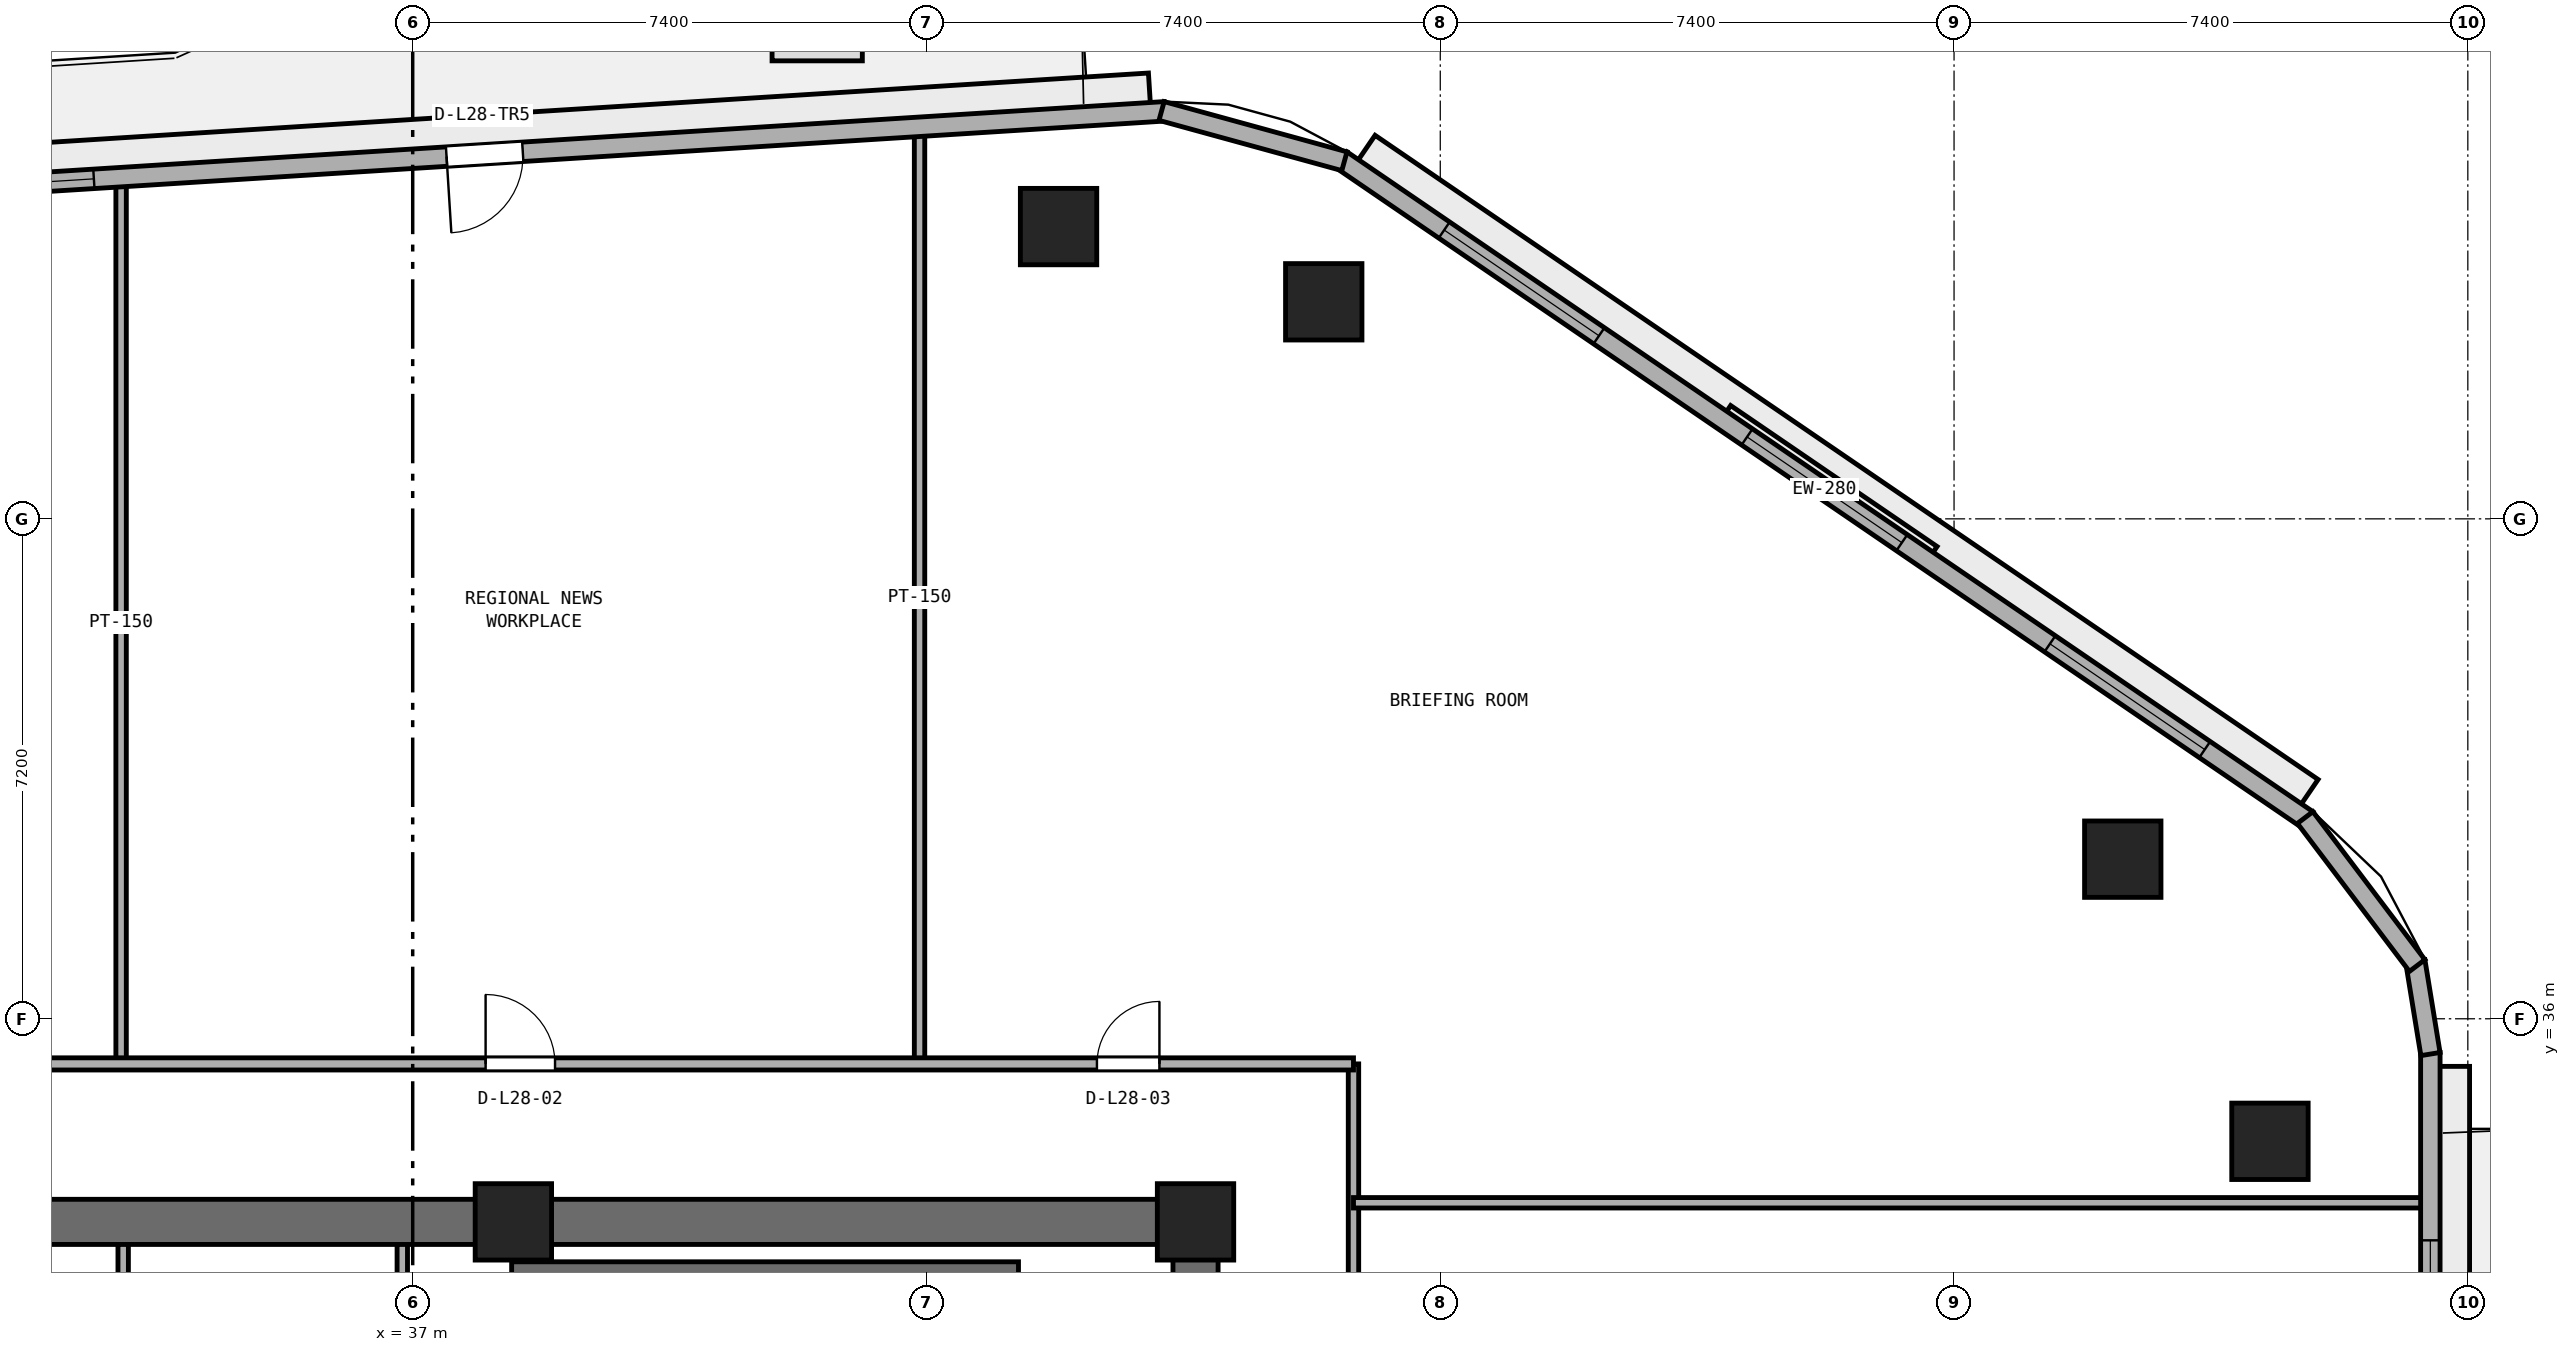
"""IFC4 building model, lengths in metres.
Left out: names, types, materials, properties, quantities, classifications, styles, units other than length and angle.
Written with IfcOpenShell. Run it as: python <this file> out.ifc"""

import sys

from ifc_helpers import new_model, si_unit, direction, frame, frame_2d, origin, origin_2d, place, context, subcontext, project, spatial, rectangle, extrude, element, fill, save


model = new_model("IFC4")
c1 = context("Model", 3, precision=1e-05, world=origin(), true_north=direction((0.0, 1.0)))
c2 = subcontext(c1, "Body", "Model", "MODEL_VIEW")
j1 = project(units=[si_unit("LENGTHUNIT", "METRE"), si_unit("PLANEANGLEUNIT", "RADIAN")], contexts=[c1])
p1 = place(None, origin())
s1 = spatial("IfcSite", under=j1, at=p1, CompositionType="ELEMENT")
p2 = place(p1, origin())
s2 = spatial("IfcBuilding", under=s1, at=p2, CompositionType="ELEMENT")
p3 = place(p2, frame((0.0, 0.0, 112.4)))
s3 = spatial("IfcBuildingStorey", under=s2, at=p3, CompositionType="ELEMENT", Elevation=112.4)
p4 = place(p3, frame((25.4, 33.075, 0.0), z_axis=(0.0, 0.0, 1.0), x_axis=(1.0, 0.0, 0.0)))
e1 = element("IfcWall", 1, at=p4, inside=s3, PredefinedType="SHEAR", context=c2, shape_type="SweptSolid", body=[
    extrude(rectangle(XDim=23.2, YDim=0.65, at=frame_2d((11.6, 0.0))), origin(), (0.0, 0.0, 1.0), 3.525),
])
p5 = place(p3, frame((48.275, 17.65, 0.0), z_axis=(0.0, 0.0, 1.0), x_axis=(0.0, 1.0, 0.0)))
e2 = element("IfcWall", 2, at=p5, inside=s3, PredefinedType="SHEAR", context=c2, shape_type="SweptSolid", body=[
    extrude(rectangle(XDim=15.1, YDim=0.65, at=frame_2d((7.55, 0.0))), origin(), (0.0, 0.0, 1.0), 3.525),
])
p6 = place(p5, frame((5.65, 0.0, 0.0)))
e3 = element("IfcOpeningElement", 3, at=p6, cuts=e2, PredefinedType="OPENING", context=c2, shape_type="SweptSolid", body=[
    extrude(rectangle(XDim=1.5, YDim=2.15, at=frame_2d((0.75, 1.075))), frame((0.0, 0.335, 0.0), z_axis=(0.0, -1.0, 0.0), x_axis=(1.0, 0.0, 0.0)), (0.0, 0.0, 1.0), 0.67),
])
for number, where, z_axis, x_axis in (
    (4, (48.275, 33.075, 0.0), (0.0, 0.0, 1.0), (1.0, 0.0, 0.0)),
    (5, (38.45, 33.075, 0.0), (0.0, 0.0, 1.0), (1.0, 0.0, 0.0)),
):
    element("IfcColumn", number, at=place(p3, frame(where, z_axis=z_axis, x_axis=x_axis)), inside=s3, PredefinedType="PILASTER", context=c2, shape_type="SweptSolid", body=[
        extrude(rectangle(XDim=1.1, YDim=1.1, at=origin_2d()), origin(), (0.0, 0.0, 1.0), 3.8),
    ])
for number, where, z_axis, x_axis in (
    (6, (63.75, 34.235, 0.0), (0.0, 0.0, 1.0), (1.0, 0.0, 0.0)),
    (7, (61.63, 38.299, 0.0), (0.0, 0.0, 1.0), (1.0, 0.0, 0.0)),
    (8, (50.122, 46.326, 0.0), (0.0, 0.0, 1.0), (1.0, 0.0, 0.0)),
    (9, (46.302, 47.409, 0.0), (0.0, 0.0, 1.0), (1.0, 0.0, 0.0)),
):
    element("IfcColumn", number, at=place(p3, frame(where, z_axis=z_axis, x_axis=x_axis)), inside=s3, PredefinedType="COLUMN", context=c2, shape_type="SweptSolid", body=[
        extrude(rectangle(XDim=1.1, YDim=1.1, at=origin_2d()), origin(), (0.0, 0.0, 1.0), 3.8),
    ])
p7 = place(p3, frame((38.425, 32.375, 0.0), z_axis=(0.0, 0.0, 1.0), x_axis=(1.0, 0.0, 0.0)))
e10 = element("IfcWall", 10, at=p7, inside=s3, PredefinedType="SHEAR", context=c2, shape_type="SweptSolid", body=[
    extrude(rectangle(XDim=7.3, YDim=0.25, at=frame_2d((3.65, 0.0))), origin(), (0.0, 0.0, 1.0), 3.525),
])
for number, where, z_axis, x_axis in (
    (11, (32.83, 30.65, 0.0), (0.0, 0.0, 1.0), (0.0, 1.0, 0.0)),
    (12, (36.85, 30.65, 0.0), (0.0, 0.0, 1.0), (0.0, 1.0, 0.0)),
):
    element("IfcWall", number, at=place(p3, frame(where, z_axis=z_axis, x_axis=x_axis)), inside=s3, PredefinedType="PARTITIONING", context=c2, shape_type="SweptSolid", body=[
        extrude(rectangle(XDim=2.1, YDim=0.15, at=frame_2d((1.05, 0.0))), origin(), (0.0, 0.0, 1.0), 3.525),
    ])
p8 = place(p3, frame((50.55, 15.05, 0.0), z_axis=(0.0, 0.0, 1.0), x_axis=(0.0, 1.0, 0.0)))
e13 = element("IfcWall", 13, at=p8, inside=s3, PredefinedType="PARTITIONING", context=c2, shape_type="SweptSolid", body=[
    extrude(rectangle(XDim=20.3, YDim=0.15, at=frame_2d((10.15, 0.0))), origin(), (0.0, 0.0, 1.0), 3.525),
])
p9 = place(p8, frame((9.7, 0.0, 0.0)))
e14 = element("IfcOpeningElement", 14, at=p9, cuts=e13, PredefinedType="OPENING", context=c2, shape_type="SweptSolid", body=[
    extrude(rectangle(XDim=0.9, YDim=2.1, at=frame_2d((0.45, 1.05))), frame((0.0, 0.085, 0.0), z_axis=(0.0, -1.0, 0.0), x_axis=(1.0, 0.0, 0.0)), (0.0, 0.0, 1.0), 0.17),
])
p10 = place(p3, frame((44.3, 35.35, 0.0), z_axis=(0.0, 0.0, 1.0), x_axis=(0.0, 1.0, 0.0)))
e15 = element("IfcWall", 15, at=p10, inside=s3, PredefinedType="PARTITIONING", context=c2, shape_type="SweptSolid", body=[
    extrude(rectangle(XDim=13.432, YDim=0.15, at=frame_2d((6.716, 0.0))), origin(), (0.0, 0.0, 1.0), 3.525),
])
p11 = place(p3, frame((32.8, 35.35, 0.0), z_axis=(0.0, 0.0, 1.0), x_axis=(0.0, 1.0, 0.0)))
e16 = element("IfcWall", 16, at=p11, inside=s3, PredefinedType="PARTITIONING", context=c2, shape_type="SweptSolid", body=[
    extrude(rectangle(XDim=12.707, YDim=0.15, at=frame_2d((6.353, 0.0))), origin(), (0.0, 0.0, 1.0), 3.525),
])
p12 = place(p3, frame((50.55, 33.35, 0.0), z_axis=(0.0, 0.0, 1.0), x_axis=(1.0, 0.0, 0.0)))
e17 = element("IfcWall", 17, at=p12, inside=s3, PredefinedType="PARTITIONING", context=c2, shape_type="SweptSolid", body=[
    extrude(rectangle(XDim=15.445, YDim=0.15, at=frame_2d((7.723, 0.0))), origin(), (0.0, 0.0, 1.0), 2.908),
])
p13 = place(p3, frame((23.45, 35.35, 0.0), z_axis=(0.0, 0.0, 1.0), x_axis=(1.0, 0.0, 0.0)))
e18 = element("IfcWall", 18, at=p13, inside=s3, PredefinedType="PARTITIONING", context=c2, shape_type="SweptSolid", body=[
    extrude(rectangle(XDim=27.1, YDim=0.175, at=frame_2d((13.55, 0.0))), origin(), (0.0, 0.0, 1.0), 3.525),
])
p14 = place(p13, frame((4.295, 0.0, 0.0)))
e19 = element("IfcOpeningElement", 19, at=p14, cuts=e18, PredefinedType="OPENING", context=c2, shape_type="SweptSolid", body=[
    extrude(rectangle(XDim=1.0, YDim=2.12, at=frame_2d((0.5, 1.06))), frame((0.0, 0.097, 0.0), z_axis=(0.0, -1.0, 0.0), x_axis=(1.0, 0.0, 0.0)), (0.0, 0.0, 1.0), 0.195),
])
p15 = place(p13, frame((14.6, 0.0, 0.0)))
e20 = element("IfcOpeningElement", 20, at=p15, cuts=e18, PredefinedType="OPENING", context=c2, shape_type="SweptSolid", body=[
    extrude(rectangle(XDim=1.0, YDim=2.12, at=frame_2d((0.5, 1.06))), frame((0.0, 0.097, 0.0), z_axis=(0.0, -1.0, 0.0), x_axis=(1.0, 0.0, 0.0)), (0.0, 0.0, 1.0), 0.195),
])
p16 = place(p13, frame((23.405, 0.0, 0.0)))
e21 = element("IfcOpeningElement", 21, at=p16, cuts=e18, PredefinedType="OPENING", context=c2, shape_type="SweptSolid", body=[
    extrude(rectangle(XDim=0.9, YDim=2.1, at=frame_2d((0.45, 1.05))), frame((0.0, 0.097, 0.0), z_axis=(0.0, -1.0, 0.0), x_axis=(1.0, 0.0, 0.0)), (0.0, 0.0, 1.0), 0.195),
])
p17 = place(p3, frame((66.06, 16.183, 0.0), z_axis=(0.0, 0.0, 1.0), x_axis=(0.0, 1.0, 0.0)))
e22 = element("IfcWall", 22, at=p17, inside=s3, PredefinedType="STANDARD", context=c2, shape_type="SweptSolid", body=[
    extrude(rectangle(XDim=19.331, YDim=0.28, at=frame_2d((9.666, 0.0))), origin(), (0.0, 0.0, 1.0), 3.525),
])
p18 = place(p17, frame((9.115, 0.0, 0.0)))
e23 = element("IfcOpeningElement", 23, at=p18, cuts=e22, PredefinedType="OPENING", context=c2, shape_type="SweptSolid", body=[
    extrude(rectangle(XDim=1.1, YDim=2.2, at=frame_2d((0.55, 1.1))), frame((0.0, 0.15, 0.0), z_axis=(0.0, -1.0, 0.0), x_axis=(1.0, 0.0, 0.0)), (0.0, 0.0, 1.0), 0.3),
])
p19 = place(p17, frame((2.205, 0.0, 0.9)))
e24 = element("IfcOpeningElement", 24, at=p19, cuts=e22, PredefinedType="OPENING", context=c2, shape_type="SweptSolid", body=[
    extrude(rectangle(XDim=2.7, YDim=1.75, at=frame_2d((1.35, 0.875))), frame((0.0, 0.15, 0.0), z_axis=(0.0, -1.0, 0.0), x_axis=(1.0, 0.0, 0.0)), (0.0, 0.0, 1.0), 0.3),
])
p20 = place(p17, frame((13.926, 0.0, 0.9)))
e25 = element("IfcOpeningElement", 25, at=p20, cuts=e22, PredefinedType="OPENING", context=c2, shape_type="SweptSolid", body=[
    extrude(rectangle(XDim=2.7, YDim=1.75, at=frame_2d((1.35, 0.875))), frame((0.0, 0.15, 0.0), z_axis=(0.0, -1.0, 0.0), x_axis=(1.0, 0.0, 0.0)), (0.0, 0.0, 1.0), 0.3),
])
p21 = place(p3, frame((64.29, 38.867, 0.0), z_axis=(0.0, 0.0, 1.0), x_axis=(-0.825755550159, 0.564028165416, 0.0)))
e26 = element("IfcWall", 26, at=p21, inside=s3, PredefinedType="STANDARD", context=c2, shape_type="SweptSolid", body=[
    extrude(rectangle(XDim=16.848, YDim=0.28, at=frame_2d((8.424, 0.0))), origin(), (0.0, 0.0, 1.0), 3.525),
])
p22 = place(p21, frame((1.792, 0.0, 0.9)))
e27 = element("IfcOpeningElement", 27, at=p22, cuts=e26, PredefinedType="OPENING", context=c2, shape_type="SweptSolid", body=[
    extrude(rectangle(XDim=2.7, YDim=1.75, at=frame_2d((1.35, 0.875))), frame((0.0, 0.15, 0.0), z_axis=(0.0, -1.0, 0.0), x_axis=(1.0, 0.0, 0.0)), (0.0, 0.0, 1.0), 0.3),
])
p23 = place(p21, frame((7.074, 0.0, 0.9)))
e28 = element("IfcOpeningElement", 28, at=p23, cuts=e26, PredefinedType="OPENING", context=c2, shape_type="SweptSolid", body=[
    extrude(rectangle(XDim=2.7, YDim=1.75, at=frame_2d((1.35, 0.875))), frame((0.0, 0.15, 0.0), z_axis=(0.0, -1.0, 0.0), x_axis=(1.0, 0.0, 0.0)), (0.0, 0.0, 1.0), 0.3),
])
p24 = place(p21, frame((12.357, 0.0, 0.9)))
e29 = element("IfcOpeningElement", 29, at=p24, cuts=e26, PredefinedType="OPENING", context=c2, shape_type="SweptSolid", body=[
    extrude(rectangle(XDim=2.7, YDim=1.75, at=frame_2d((1.35, 0.875))), frame((0.0, 0.15, 0.0), z_axis=(0.0, -1.0, 0.0), x_axis=(1.0, 0.0, 0.0)), (0.0, 0.0, 1.0), 0.3),
])
p25 = place(p3, frame((47.832, 49.069, 0.0), z_axis=(0.0, 0.0, 1.0), x_axis=(-0.998017725054, -0.062933460723, 0.0)))
e30 = element("IfcWall", 30, at=p25, inside=s3, PredefinedType="STANDARD", context=c2, shape_type="SweptSolid", body=[
    extrude(rectangle(XDim=19.629, YDim=0.28, at=frame_2d((9.815, 0.0))), origin(), (0.0, 0.0, 1.0), 3.525),
])
p26 = place(p25, frame((9.265, 0.0, 0.0)))
e31 = element("IfcOpeningElement", 31, at=p26, cuts=e30, PredefinedType="OPENING", context=c2, shape_type="SweptSolid", body=[
    extrude(rectangle(XDim=1.1, YDim=2.2, at=frame_2d((0.55, 1.1))), frame((0.0, 0.15, 0.0), z_axis=(0.0, -1.0, 0.0), x_axis=(1.0, 0.0, 0.0)), (0.0, 0.0, 1.0), 0.3),
])
p27 = place(p25, frame((15.455, 0.0, 0.9)))
e32 = element("IfcOpeningElement", 32, at=p27, cuts=e30, PredefinedType="OPENING", context=c2, shape_type="SweptSolid", body=[
    extrude(rectangle(XDim=2.7, YDim=1.75, at=frame_2d((1.35, 0.875))), frame((0.0, 0.15, 0.0), z_axis=(0.0, -1.0, 0.0), x_axis=(1.0, 0.0, 0.0)), (0.0, 0.0, 1.0), 0.3),
])
p28 = place(p3, frame((66.062, 35.492, 0.0), z_axis=(0.0, 0.0, 1.0), x_axis=(-0.161182073582, 0.986924687682, 0.0)))
e33 = element("IfcWall", 33, at=p28, inside=s3, PredefinedType="STANDARD", context=c2, shape_type="SweptSolid", body=[
    extrude(rectangle(XDim=1.354, YDim=0.28, at=frame_2d((0.677, 0.0))), origin(), (0.0, 0.0, 1.0), 3.525),
])
p29 = place(p3, frame((65.87, 36.767, 0.0), z_axis=(0.0, 0.0, 1.0), x_axis=(-0.603370463754, 0.797461023166, 0.0)))
e34 = element("IfcWall", 34, at=p29, inside=s3, PredefinedType="STANDARD", context=c2, shape_type="SweptSolid", body=[
    extrude(rectangle(XDim=2.673, YDim=0.28, at=frame_2d((1.336, 0.0))), origin(), (0.0, 0.0, 1.0), 3.525),
])
p30 = place(p3, frame((50.419, 48.351, 0.0), z_axis=(0.0, 0.0, 1.0), x_axis=(-0.964254516967, 0.264977784933, 0.0)))
e35 = element("IfcWall", 35, at=p30, inside=s3, PredefinedType="STANDARD", context=c2, shape_type="SweptSolid", body=[
    extrude(rectangle(XDim=2.731, YDim=0.28, at=frame_2d((1.365, 0.0))), origin(), (0.0, 0.0, 1.0), 3.525),
])
p31 = place(p15, origin())
e36 = element("IfcDoor", 36, at=p31, inside=s3, OperationType="SINGLE_SWING_LEFT", PredefinedType="DOOR", context=c2, shape_type="SweptSolid", body=[
    extrude(rectangle(XDim=1.0, YDim=2.12, at=frame_2d((0.5, 1.06))), frame((0.0, 0.025, 0.0), z_axis=(0.0, -1.0, 0.0), x_axis=(1.0, 0.0, 0.0)), (0.0, 0.0, 1.0), 0.05),
])
fill(e20, e36)
p32 = place(p16, origin())
e37 = element("IfcDoor", 37, at=p32, inside=s3, OperationType="SINGLE_SWING_RIGHT", PredefinedType="DOOR", context=c2, shape_type="SweptSolid", body=[
    extrude(rectangle(XDim=0.9, YDim=2.1, at=frame_2d((0.45, 1.05))), frame((0.0, 0.025, 0.0), z_axis=(0.0, -1.0, 0.0), x_axis=(1.0, 0.0, 0.0)), (0.0, 0.0, 1.0), 0.05),
])
fill(e21, e37)
p33 = place(p20, origin())
e38 = element("IfcWindow", 38, at=p33, inside=s3, PartitioningType="SINGLE_PANEL", PredefinedType="WINDOW", context=c2, shape_type="SweptSolid", body=[
    extrude(rectangle(XDim=2.7, YDim=1.75, at=frame_2d((1.35, 0.875))), frame((0.0, 0.03, 0.0), z_axis=(0.0, -1.0, 0.0), x_axis=(1.0, 0.0, 0.0)), (0.0, 0.0, 1.0), 0.06),
])
fill(e25, e38)
p34 = place(p22, origin())
e39 = element("IfcWindow", 39, at=p34, inside=s3, PartitioningType="SINGLE_PANEL", PredefinedType="WINDOW", context=c2, shape_type="SweptSolid", body=[
    extrude(rectangle(XDim=2.7, YDim=1.75, at=frame_2d((1.35, 0.875))), frame((0.0, 0.03, 0.0), z_axis=(0.0, -1.0, 0.0), x_axis=(1.0, 0.0, 0.0)), (0.0, 0.0, 1.0), 0.06),
])
fill(e27, e39)
p35 = place(p23, origin())
e40 = element("IfcWindow", 40, at=p35, inside=s3, PartitioningType="SINGLE_PANEL", PredefinedType="WINDOW", context=c2, shape_type="SweptSolid", body=[
    extrude(rectangle(XDim=2.7, YDim=1.75, at=frame_2d((1.35, 0.875))), frame((0.0, 0.03, 0.0), z_axis=(0.0, -1.0, 0.0), x_axis=(1.0, 0.0, 0.0)), (0.0, 0.0, 1.0), 0.06),
])
fill(e28, e40)
p36 = place(p24, origin())
e41 = element("IfcWindow", 41, at=p36, inside=s3, PartitioningType="SINGLE_PANEL", PredefinedType="WINDOW", context=c2, shape_type="SweptSolid", body=[
    extrude(rectangle(XDim=2.7, YDim=1.75, at=frame_2d((1.35, 0.875))), frame((0.0, 0.03, 0.0), z_axis=(0.0, -1.0, 0.0), x_axis=(1.0, 0.0, 0.0)), (0.0, 0.0, 1.0), 0.06),
])
fill(e29, e41)
p37 = place(p26, origin())
e42 = element("IfcDoor", 42, at=p37, inside=s3, OperationType="SINGLE_SWING_RIGHT", PredefinedType="DOOR", context=c2, shape_type="SweptSolid", body=[
    extrude(rectangle(XDim=1.1, YDim=2.2, at=frame_2d((0.55, 1.1))), frame((0.0, 0.025, 0.0), z_axis=(0.0, -1.0, 0.0), x_axis=(1.0, 0.0, 0.0)), (0.0, 0.0, 1.0), 0.05),
])
fill(e31, e42)
p38 = place(p27, origin())
e43 = element("IfcWindow", 43, at=p38, inside=s3, PartitioningType="SINGLE_PANEL", PredefinedType="WINDOW", context=c2, shape_type="SweptSolid", body=[
    extrude(rectangle(XDim=2.7, YDim=1.75, at=frame_2d((1.35, 0.875))), frame((0.0, 0.03, 0.0), z_axis=(0.0, -1.0, 0.0), x_axis=(1.0, 0.0, 0.0)), (0.0, 0.0, 1.0), 0.06),
])
fill(e32, e43)
save(model, sys.argv[1])
